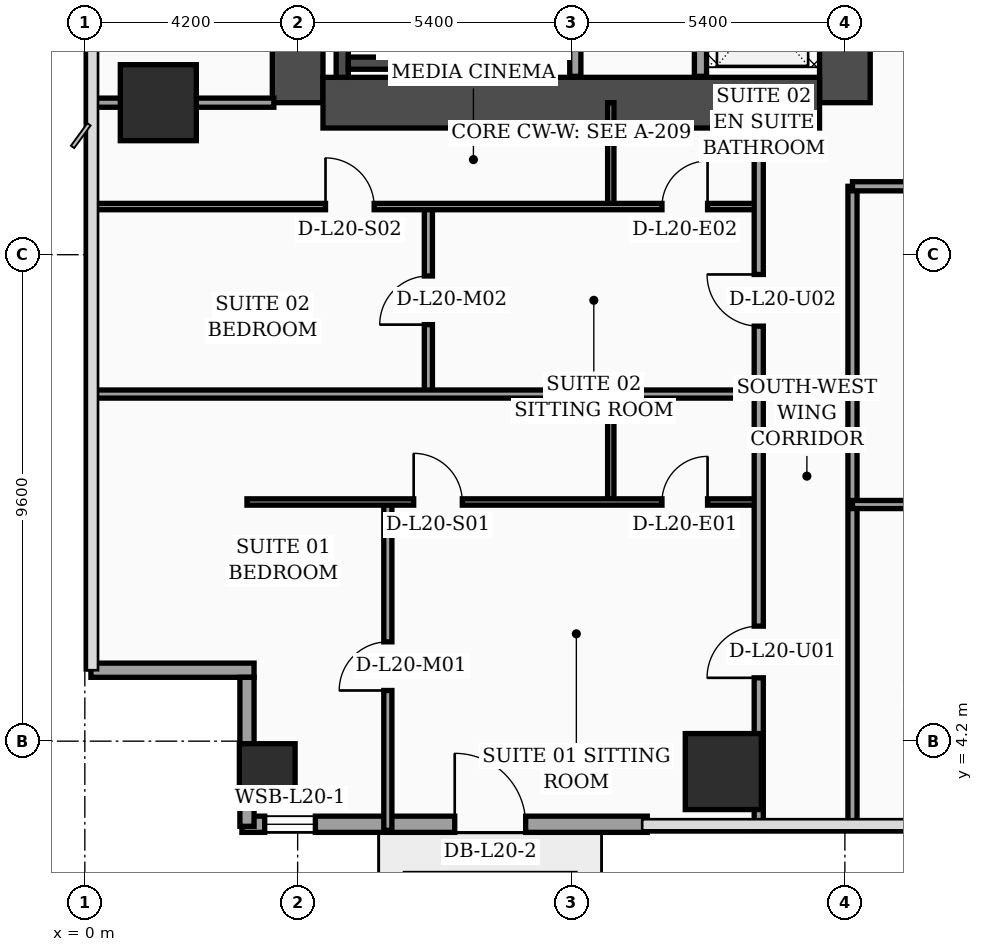
"""IFC4 building model, lengths in metres.
Left out: names, types, materials, properties, quantities, classifications, styles, units other than length and angle.
Written with IfcOpenShell. Run it as: python <this file> out.ifc"""

import sys

from ifc_helpers import new_model, si_unit, direction, frame, frame_2d, origin, origin_2d, place, context, subcontext, project, spatial, rectangle, hollow_rectangle, extrude, element, fill, save


model = new_model("IFC4")
c1 = context("Model", 3, precision=1e-05, world=origin(), true_north=direction((0.0, 1.0)))
c2 = subcontext(c1, "Body", "Model", "MODEL_VIEW")
j1 = project(units=[si_unit("LENGTHUNIT", "METRE"), si_unit("PLANEANGLEUNIT", "RADIAN")], contexts=[c1])
p1 = place(None, origin())
s1 = spatial("IfcSite", under=j1, at=p1, CompositionType="ELEMENT")
p2 = place(p1, origin())
s2 = spatial("IfcBuilding", under=s1, at=p2, CompositionType="ELEMENT")
p3 = place(p2, frame((0.0, 0.0, 85.0)))
s3 = spatial("IfcBuildingStorey", under=s2, at=p3, CompositionType="ELEMENT", Elevation=85.0)
p4 = place(p3, frame((4.2, 16.8, 0.0), z_axis=(0.0, 0.0, 1.0), x_axis=(0.0, 1.0, 0.0)))
e1 = element("IfcWall", 1, at=p4, inside=s3, PredefinedType="SHEAR", context=c2, shape_type="SweptSolid", body=[
    extrude(rectangle(XDim=21.6, YDim=1.0, at=frame_2d((10.8, 0.0))), origin(), (0.0, 0.0, 1.0), 3.56),
])
p5 = place(p3, frame((15.0, 16.8, 0.0), z_axis=(0.0, 0.0, 1.0), x_axis=(0.0, 1.0, 0.0)))
e2 = element("IfcWall", 2, at=p5, inside=s3, PredefinedType="SHEAR", context=c2, shape_type="SweptSolid", body=[
    extrude(rectangle(XDim=21.6, YDim=1.0, at=frame_2d((10.8, 0.0))), origin(), (0.0, 0.0, 1.0), 3.56),
])
p6 = place(p5, frame((8.65, 0.0, 0.0)))
e3 = element("IfcOpeningElement", 3, at=p6, cuts=e2, PredefinedType="OPENING", context=c2, shape_type="SweptSolid", body=[
    extrude(rectangle(XDim=1.1, YDim=2.2, at=frame_2d((0.55, 1.1))), frame((0.0, 0.51, 0.0), z_axis=(0.0, -1.0, 0.0), x_axis=(1.0, 0.0, 0.0)), (0.0, 0.0, 1.0), 1.02),
])
p7 = place(p5, frame((1.25, 0.0, 0.0)))
e4 = element("IfcOpeningElement", 4, at=p7, cuts=e2, PredefinedType="OPENING", context=c2, shape_type="SweptSolid", body=[
    extrude(rectangle(XDim=1.1, YDim=2.2, at=frame_2d((0.55, 1.1))), frame((0.0, 0.51, 0.0), z_axis=(0.0, -1.0, 0.0), x_axis=(1.0, 0.0, 0.0)), (0.0, 0.0, 1.0), 1.02),
])
p8 = place(p5, frame((3.8, 0.0, 0.0)))
e5 = element("IfcOpeningElement", 5, at=p8, cuts=e2, PredefinedType="OPENING", context=c2, shape_type="SweptSolid", body=[
    extrude(rectangle(XDim=1.1, YDim=2.2, at=frame_2d((0.55, 1.1))), frame((0.0, 0.51, 0.0), z_axis=(0.0, -1.0, 0.0), x_axis=(1.0, 0.0, 0.0)), (0.0, 0.0, 1.0), 1.02),
])
p9 = place(p5, frame((6.35, 0.0, 0.0)))
e6 = element("IfcOpeningElement", 6, at=p9, cuts=e2, PredefinedType="OPENING", context=c2, shape_type="SweptSolid", body=[
    extrude(rectangle(XDim=1.1, YDim=2.2, at=frame_2d((0.55, 1.1))), frame((0.0, 0.51, 0.0), z_axis=(0.0, -1.0, 0.0), x_axis=(1.0, 0.0, 0.0)), (0.0, 0.0, 1.0), 1.02),
])
p10 = place(p3, frame((4.7, 16.8, 0.0), z_axis=(0.0, 0.0, 1.0), x_axis=(1.0, 0.0, 0.0)))
e7 = element("IfcWall", 7, at=p10, inside=s3, PredefinedType="SHEAR", context=c2, shape_type="SweptSolid", body=[
    extrude(rectangle(XDim=9.8, YDim=1.0, at=frame_2d((4.9, 0.0))), origin(), (0.0, 0.0, 1.0), 3.56),
])
p11 = place(p3, frame((5.08, 17.3, 0.0), z_axis=(0.0, 0.0, 1.0), x_axis=(0.0, 1.0, 0.0)))
e8 = element("IfcWall", 8, at=p11, inside=s3, PredefinedType="SOLIDWALL", context=c2, shape_type="SweptSolid", body=[
    extrude(rectangle(XDim=9.49, YDim=0.24, at=frame_2d((4.745, 0.0))), origin(), (0.0, 0.0, 1.0), 3.56),
])
p12 = place(p3, frame((8.42, 17.3, 0.0), z_axis=(0.0, 0.0, 1.0), x_axis=(0.0, 1.0, 0.0)))
e9 = element("IfcWall", 9, at=p12, inside=s3, PredefinedType="SOLIDWALL", context=c2, shape_type="SweptSolid", body=[
    extrude(rectangle(XDim=9.49, YDim=0.24, at=frame_2d((4.745, 0.0))), origin(), (0.0, 0.0, 1.0), 3.56),
])
p13 = place(p12, frame((0.35, 0.0, 0.0)))
e10 = element("IfcOpeningElement", 10, at=p13, cuts=e9, PredefinedType="OPENING", context=c2, shape_type="SweptSolid", body=[
    extrude(rectangle(XDim=1.15, YDim=2.2, at=frame_2d((0.575, 1.1))), frame((0.0, 0.13, 0.0), z_axis=(0.0, -1.0, 0.0), x_axis=(1.0, 0.0, 0.0)), (0.0, 0.0, 1.0), 0.26),
])
p14 = place(p3, frame((5.2, 17.58, 0.0), z_axis=(0.0, 0.0, 1.0), x_axis=(1.0, 0.0, 0.0)))
e11 = element("IfcWall", 11, at=p14, inside=s3, PredefinedType="SOLIDWALL", context=c2, shape_type="SweptSolid", body=[
    extrude(rectangle(XDim=3.1, YDim=0.24, at=frame_2d((1.55, 0.0))), origin(), (0.0, 0.0, 1.0), 3.56),
])
p15 = place(p3, frame((3.6, 3.6, 0.0), z_axis=(0.0, 0.0, 1.0), x_axis=(1.0, 0.0, 0.0)))
e12 = element("IfcColumn", 12, at=p15, inside=s3, PredefinedType="COLUMN", context=c2, shape_type="SweptSolid", body=[
    extrude(hollow_rectangle(XDim=1.1, YDim=1.1, WallThickness=0.045, at=origin_2d()), origin(), (0.0, 0.0, 1.0), 3.56),
])
for number, where, z_axis, x_axis in (
    (13, (1.45, 16.8, 0.0), (0.0, 0.0, 1.0), (1.0, 0.0, 0.0)),
    (14, (12.6, 3.6, 0.0), (0.0, 0.0, 1.0), (1.0, 0.0, 0.0)),
):
    element("IfcColumn", number, at=place(p3, frame(where, z_axis=z_axis, x_axis=x_axis)), inside=s3, PredefinedType="COLUMN", context=c2, shape_type="SweptSolid", body=[
        extrude(rectangle(XDim=1.5, YDim=1.5, at=origin_2d()), origin(), (0.0, 0.0, 1.0), 3.56),
    ])
p16 = place(p3, frame((3.1, 2.56, 0.0), z_axis=(0.0, 0.0, 1.0), x_axis=(1.0, 0.0, 0.0)))
e15 = element("IfcWall", 15, at=p16, inside=s3, PredefinedType="SOLIDWALL", context=c2, shape_type="SweptSolid", body=[
    extrude(rectangle(XDim=8.0, YDim=0.32, at=frame_2d((4.0, 0.0))), origin(), (0.0, 0.0, 1.0), 3.56),
])
p17 = place(p16, frame((0.45, 0.0, 0.75)))
e16 = element("IfcOpeningElement", 16, at=p17, cuts=e15, PredefinedType="OPENING", context=c2, shape_type="SweptSolid", body=[
    extrude(rectangle(XDim=1.0, YDim=1.6, at=frame_2d((0.5, 0.8))), frame((0.0, 0.17, 0.0), z_axis=(0.0, -1.0, 0.0), x_axis=(1.0, 0.0, 0.0)), (0.0, 0.0, 1.0), 0.34),
])
p18 = place(p16, frame((4.2, 0.0, 0.0)))
e17 = element("IfcOpeningElement", 17, at=p18, cuts=e15, PredefinedType="OPENING", context=c2, shape_type="SweptSolid", body=[
    extrude(rectangle(XDim=1.4, YDim=2.25, at=frame_2d((0.7, 1.125))), frame((0.0, 0.17, 0.0), z_axis=(0.0, -1.0, 0.0), x_axis=(1.0, 0.0, 0.0)), (0.0, 0.0, 1.0), 0.34),
])
p19 = place(p3, frame((0.12, 5.6, 0.0), z_axis=(0.0, 0.0, 1.0), x_axis=(1.0, 0.0, 0.0)))
e18 = element("IfcWall", 18, at=p19, inside=s3, PredefinedType="SOLIDWALL", context=c2, shape_type="SweptSolid", body=[
    extrude(rectangle(XDim=3.22, YDim=0.28, at=frame_2d((1.61, 0.0))), origin(), (0.0, 0.0, 1.0), 2.84),
])
p20 = place(p3, frame((3.2, 5.46, 0.0), z_axis=(0.0, 0.0, 1.0), x_axis=(0.0, -1.0, 0.0)))
e19 = element("IfcWall", 19, at=p20, inside=s3, PredefinedType="SOLIDWALL", context=c2, shape_type="SweptSolid", body=[
    extrude(rectangle(XDim=2.94, YDim=0.28, at=frame_2d((1.47, 0.0))), origin(), (0.0, 0.0, 1.0), 2.84),
])
p21 = place(p3, frame((9.68, 17.32, 0.0), z_axis=(0.0, 0.0, 1.0), x_axis=(0.0, 1.0, 0.0)))
e20 = element("IfcWall", 20, at=p21, inside=s3, PredefinedType="SOLIDWALL", context=c2, shape_type="SweptSolid", body=[
    extrude(rectangle(XDim=7.68, YDim=0.22, at=frame_2d((3.84, 0.0))), origin(), (0.0, 0.0, 1.0), 3.56),
])
p22 = place(p3, frame((12.15, 17.32, 0.0), z_axis=(0.0, 0.0, 1.0), x_axis=(0.0, 1.0, 0.0)))
e21 = element("IfcWall", 21, at=p22, inside=s3, PredefinedType="SOLIDWALL", context=c2, shape_type="SweptSolid", body=[
    extrude(rectangle(XDim=7.65, YDim=0.24, at=frame_2d((3.825, 0.0))), origin(), (0.0, 0.0, 1.0), 3.56),
])
p23 = place(p3, frame((0.08, 16.8, 0.0), z_axis=(0.0, 0.0, 1.0), x_axis=(1.0, 0.0, 0.0)))
e22 = element("IfcWall", 22, at=p23, inside=s3, PredefinedType="PARTITIONING", context=c2, shape_type="SweptSolid", body=[
    extrude(rectangle(XDim=3.65, YDim=0.18, at=frame_2d((1.825, 0.0))), origin(), (0.0, 0.0, 1.0), 2.84),
])
p24 = place(p3, frame((10.38, 8.92, 0.0), z_axis=(0.0, 0.0, 1.0), x_axis=(0.0, 1.0, 0.0)))
e23 = element("IfcWall", 23, at=p24, inside=s3, PredefinedType="PARTITIONING", context=c2, shape_type="SweptSolid", body=[
    extrude(rectangle(XDim=2.13, YDim=0.125, at=frame_2d((1.065, 0.0))), origin(), (0.0, 0.0, 1.0), 3.14),
])
p25 = place(p3, frame((5.98, 2.44, 0.0), z_axis=(0.0, 0.0, 1.0), x_axis=(0.0, 1.0, 0.0)))
e24 = element("IfcWall", 24, at=p25, inside=s3, PredefinedType="PARTITIONING", context=c2, shape_type="SweptSolid", body=[
    extrude(rectangle(XDim=6.48, YDim=0.16, at=frame_2d((3.24, 0.0))), origin(), (0.0, 0.0, 1.0), 3.04),
])
p26 = place(p25, frame((2.76, 0.0, 0.0)))
e25 = element("IfcOpeningElement", 25, at=p26, cuts=e24, PredefinedType="OPENING", context=c2, shape_type="SweptSolid", body=[
    extrude(rectangle(XDim=0.96, YDim=2.2, at=frame_2d((0.48, 1.1))), frame((0.0, 0.09, 0.0), z_axis=(0.0, -1.0, 0.0), x_axis=(1.0, 0.0, 0.0)), (0.0, 0.0, 1.0), 0.18),
])
p27 = place(p3, frame((3.2, 8.92, 0.0), z_axis=(0.0, 0.0, 1.0), x_axis=(1.0, 0.0, 0.0)))
e26 = element("IfcWall", 26, at=p27, inside=s3, PredefinedType="PARTITIONING", context=c2, shape_type="SweptSolid", body=[
    extrude(rectangle(XDim=10.1, YDim=0.125, at=frame_2d((5.05, 0.0))), origin(), (0.0, 0.0, 1.0), 2.84),
])
p28 = place(p27, frame((3.29, 0.0, 0.0)))
e27 = element("IfcOpeningElement", 27, at=p28, cuts=e26, PredefinedType="OPENING", context=c2, shape_type="SweptSolid", body=[
    extrude(rectangle(XDim=0.96, YDim=2.2, at=frame_2d((0.48, 1.1))), frame((0.0, 0.073, 0.0), z_axis=(0.0, -1.0, 0.0), x_axis=(1.0, 0.0, 0.0)), (0.0, 0.0, 1.0), 0.145),
])
p29 = place(p27, frame((8.19, 0.0, 0.0)))
e28 = element("IfcOpeningElement", 28, at=p29, cuts=e26, PredefinedType="OPENING", context=c2, shape_type="SweptSolid", body=[
    extrude(rectangle(XDim=0.9, YDim=2.15, at=frame_2d((0.45, 1.075))), frame((0.0, 0.073, 0.0), z_axis=(0.0, -1.0, 0.0), x_axis=(1.0, 0.0, 0.0)), (0.0, 0.0, 1.0), 0.145),
])
p30 = place(p3, frame((10.38, 14.75, 0.0), z_axis=(0.0, 0.0, 1.0), x_axis=(0.0, 1.0, 0.0)))
e29 = element("IfcWall", 29, at=p30, inside=s3, PredefinedType="PARTITIONING", context=c2, shape_type="SweptSolid", body=[
    extrude(rectangle(XDim=2.05, YDim=0.125, at=frame_2d((1.025, 0.0))), origin(), (0.0, 0.0, 1.0), 3.56),
])
p31 = place(p3, frame((6.78, 11.05, 0.0), z_axis=(0.0, 0.0, 1.0), x_axis=(0.0, 1.0, 0.0)))
e30 = element("IfcWall", 30, at=p31, inside=s3, PredefinedType="PARTITIONING", context=c2, shape_type="SweptSolid", body=[
    extrude(rectangle(XDim=3.7, YDim=0.16, at=frame_2d((1.85, 0.0))), origin(), (0.0, 0.0, 1.0), 3.56),
])
p32 = place(p31, frame((1.37, 0.0, 0.0)))
e31 = element("IfcOpeningElement", 31, at=p32, cuts=e30, PredefinedType="OPENING", context=c2, shape_type="SweptSolid", body=[
    extrude(rectangle(XDim=0.96, YDim=2.2, at=frame_2d((0.48, 1.1))), frame((0.0, 0.09, 0.0), z_axis=(0.0, -1.0, 0.0), x_axis=(1.0, 0.0, 0.0)), (0.0, 0.0, 1.0), 0.18),
])
p33 = place(p3, frame((0.08, 14.75, 0.0), z_axis=(0.0, 0.0, 1.0), x_axis=(1.0, 0.0, 0.0)))
e32 = element("IfcWall", 32, at=p33, inside=s3, PredefinedType="PARTITIONING", context=c2, shape_type="SweptSolid", body=[
    extrude(rectangle(XDim=13.22, YDim=0.125, at=frame_2d((6.61, 0.0))), origin(), (0.0, 0.0, 1.0), 2.84),
])
p34 = place(p33, frame((4.67, 0.0, 0.0)))
e33 = element("IfcOpeningElement", 33, at=p34, cuts=e32, PredefinedType="OPENING", context=c2, shape_type="SweptSolid", body=[
    extrude(rectangle(XDim=0.96, YDim=2.2, at=frame_2d((0.48, 1.1))), frame((0.0, 0.073, 0.0), z_axis=(0.0, -1.0, 0.0), x_axis=(1.0, 0.0, 0.0)), (0.0, 0.0, 1.0), 0.145),
])
p35 = place(p33, frame((11.31, 0.0, 0.0)))
e34 = element("IfcOpeningElement", 34, at=p35, cuts=e32, PredefinedType="OPENING", context=c2, shape_type="SweptSolid", body=[
    extrude(rectangle(XDim=0.9, YDim=2.15, at=frame_2d((0.45, 1.075))), frame((0.0, 0.073, 0.0), z_axis=(0.0, -1.0, 0.0), x_axis=(1.0, 0.0, 0.0)), (0.0, 0.0, 1.0), 0.145),
])
p36 = place(p3, frame((0.08, 11.05, 0.0), z_axis=(0.0, 0.0, 1.0), x_axis=(1.0, 0.0, 0.0)))
e35 = element("IfcWall", 35, at=p36, inside=s3, PredefinedType="PARTITIONING", context=c2, shape_type="SweptSolid", body=[
    extrude(rectangle(XDim=13.22, YDim=0.16, at=frame_2d((6.61, 0.0))), origin(), (0.0, 0.0, 1.0), 2.84),
])
p37 = place(p3, frame((13.3, 2.44, 0.0), z_axis=(0.0, 0.0, 1.0), x_axis=(0.0, 1.0, 0.0)))
e36 = element("IfcWall", 36, at=p37, inside=s3, PredefinedType="PARTITIONING", context=c2, shape_type="SweptSolid", body=[
    extrude(rectangle(XDim=14.36, YDim=0.18, at=frame_2d((7.18, 0.0))), origin(), (0.0, 0.0, 1.0), 3.04),
])
p38 = place(p37, frame((3.01, 0.0, 0.0)))
e37 = element("IfcOpeningElement", 37, at=p38, cuts=e36, PredefinedType="OPENING", context=c2, shape_type="SweptSolid", body=[
    extrude(rectangle(XDim=1.02, YDim=2.2, at=frame_2d((0.51, 1.1))), frame((0.0, 0.1, 0.0), z_axis=(0.0, -1.0, 0.0), x_axis=(1.0, 0.0, 0.0)), (0.0, 0.0, 1.0), 0.2),
])
p39 = place(p37, frame((9.95, 0.0, 0.0)))
e38 = element("IfcOpeningElement", 38, at=p39, cuts=e36, PredefinedType="OPENING", context=c2, shape_type="SweptSolid", body=[
    extrude(rectangle(XDim=1.02, YDim=2.2, at=frame_2d((0.51, 1.1))), frame((0.0, 0.1, 0.0), z_axis=(0.0, -1.0, 0.0), x_axis=(1.0, 0.0, 0.0)), (0.0, 0.0, 1.0), 0.2),
])
p40 = place(p3, frame((15.15, 2.44, 0.0), z_axis=(0.0, 0.0, 1.0), x_axis=(0.0, 1.0, 0.0)))
e39 = element("IfcWall", 39, at=p40, inside=s3, PredefinedType="PARTITIONING", context=c2, shape_type="SweptSolid", body=[
    extrude(rectangle(XDim=12.71, YDim=0.18, at=frame_2d((6.355, 0.0))), origin(), (0.0, 0.0, 1.0), 3.04),
])
p41 = place(p3, frame((15.15, 8.87, 0.0), z_axis=(0.0, 0.0, 1.0), x_axis=(1.0, 0.0, 0.0)))
e40 = element("IfcWall", 40, at=p41, inside=s3, PredefinedType="PARTITIONING", context=c2, shape_type="SweptSolid", body=[
    extrude(rectangle(XDim=4.45, YDim=0.16, at=frame_2d((2.225, 0.0))), origin(), (0.0, 0.0, 1.0), 3.56),
])
p42 = place(p41, frame((1.75, 0.0, 0.0)))
e41 = element("IfcOpeningElement", 41, at=p42, cuts=e40, PredefinedType="OPENING", context=c2, shape_type="SweptSolid", body=[
    extrude(rectangle(XDim=0.96, YDim=2.2, at=frame_2d((0.48, 1.1))), frame((0.0, 0.09, 0.0), z_axis=(0.0, -1.0, 0.0), x_axis=(1.0, 0.0, 0.0)), (0.0, 0.0, 1.0), 0.18),
])
p43 = place(p3, frame((15.15, 15.15, 0.0), z_axis=(0.0, 0.0, 1.0), x_axis=(1.0, 0.0, 0.0)))
e42 = element("IfcWall", 42, at=p43, inside=s3, PredefinedType="PARTITIONING", context=c2, shape_type="SweptSolid", body=[
    extrude(rectangle(XDim=6.45, YDim=0.18, at=frame_2d((3.225, 0.0))), origin(), (0.0, 0.0, 1.0), 2.34),
])
p44 = place(p43, frame((1.74, 0.0, 0.0)))
e43 = element("IfcOpeningElement", 43, at=p44, cuts=e42, PredefinedType="OPENING", context=c2, shape_type="SweptSolid", body=[
    extrude(rectangle(XDim=1.02, YDim=2.2, at=frame_2d((0.51, 1.1))), frame((0.0, 0.1, 0.0), z_axis=(0.0, -1.0, 0.0), x_axis=(1.0, 0.0, 0.0)), (0.0, 0.0, 1.0), 0.2),
])
p45 = place(p17, origin())
e44 = element("IfcWindow", 44, at=p45, inside=s3, PartitioningType="SINGLE_PANEL", PredefinedType="WINDOW", context=c2, shape_type="SweptSolid", body=[
    extrude(rectangle(XDim=1.0, YDim=1.6, at=frame_2d((0.5, 0.8))), frame((0.0, 0.03, 0.0), z_axis=(0.0, -1.0, 0.0), x_axis=(1.0, 0.0, 0.0)), (0.0, 0.0, 1.0), 0.06),
])
fill(e16, e44)
p46 = place(p18, origin())
e45 = element("IfcDoor", 45, at=p46, inside=s3, OperationType="SINGLE_SWING_LEFT", PredefinedType="DOOR", context=c2, shape_type="SweptSolid", body=[
    extrude(rectangle(XDim=1.4, YDim=2.25, at=frame_2d((0.7, 1.125))), frame((0.0, 0.025, 0.0), z_axis=(0.0, -1.0, 0.0), x_axis=(1.0, 0.0, 0.0)), (0.0, 0.0, 1.0), 0.05),
])
fill(e17, e45)
p47 = place(p26, origin())
e46 = element("IfcDoor", 46, at=p47, inside=s3, OperationType="SINGLE_SWING_LEFT", PredefinedType="DOOR", context=c2, shape_type="SweptSolid", body=[
    extrude(rectangle(XDim=0.96, YDim=2.2, at=frame_2d((0.48, 1.1))), frame((0.0, 0.025, 0.0), z_axis=(0.0, -1.0, 0.0), x_axis=(1.0, 0.0, 0.0)), (0.0, 0.0, 1.0), 0.05),
])
fill(e25, e46)
p48 = place(p28, origin())
e47 = element("IfcDoor", 47, at=p48, inside=s3, OperationType="SINGLE_SWING_LEFT", PredefinedType="DOOR", context=c2, shape_type="SweptSolid", body=[
    extrude(rectangle(XDim=0.96, YDim=2.2, at=frame_2d((0.48, 1.1))), frame((0.0, 0.025, 0.0), z_axis=(0.0, -1.0, 0.0), x_axis=(1.0, 0.0, 0.0)), (0.0, 0.0, 1.0), 0.05),
])
fill(e27, e47)
p49 = place(p29, origin())
e48 = element("IfcDoor", 48, at=p49, inside=s3, OperationType="SINGLE_SWING_RIGHT", PredefinedType="DOOR", context=c2, shape_type="SweptSolid", body=[
    extrude(rectangle(XDim=0.9, YDim=2.15, at=frame_2d((0.45, 1.075))), frame((0.0, 0.025, 0.0), z_axis=(0.0, -1.0, 0.0), x_axis=(1.0, 0.0, 0.0)), (0.0, 0.0, 1.0), 0.05),
])
fill(e28, e48)
p50 = place(p32, origin())
e49 = element("IfcDoor", 49, at=p50, inside=s3, OperationType="SINGLE_SWING_LEFT", PredefinedType="DOOR", context=c2, shape_type="SweptSolid", body=[
    extrude(rectangle(XDim=0.96, YDim=2.2, at=frame_2d((0.48, 1.1))), frame((0.0, 0.025, 0.0), z_axis=(0.0, -1.0, 0.0), x_axis=(1.0, 0.0, 0.0)), (0.0, 0.0, 1.0), 0.05),
])
fill(e31, e49)
p51 = place(p34, origin())
e50 = element("IfcDoor", 50, at=p51, inside=s3, OperationType="SINGLE_SWING_LEFT", PredefinedType="DOOR", context=c2, shape_type="SweptSolid", body=[
    extrude(rectangle(XDim=0.96, YDim=2.2, at=frame_2d((0.48, 1.1))), frame((0.0, 0.025, 0.0), z_axis=(0.0, -1.0, 0.0), x_axis=(1.0, 0.0, 0.0)), (0.0, 0.0, 1.0), 0.05),
])
fill(e33, e50)
p52 = place(p35, origin())
e51 = element("IfcDoor", 51, at=p52, inside=s3, OperationType="SINGLE_SWING_RIGHT", PredefinedType="DOOR", context=c2, shape_type="SweptSolid", body=[
    extrude(rectangle(XDim=0.9, YDim=2.15, at=frame_2d((0.45, 1.075))), frame((0.0, 0.025, 0.0), z_axis=(0.0, -1.0, 0.0), x_axis=(1.0, 0.0, 0.0)), (0.0, 0.0, 1.0), 0.05),
])
fill(e34, e51)
p53 = place(p38, origin())
e52 = element("IfcDoor", 52, at=p53, inside=s3, OperationType="SINGLE_SWING_LEFT", PredefinedType="DOOR", context=c2, shape_type="SweptSolid", body=[
    extrude(rectangle(XDim=1.02, YDim=2.2, at=frame_2d((0.51, 1.1))), frame((0.0, 0.025, 0.0), z_axis=(0.0, -1.0, 0.0), x_axis=(1.0, 0.0, 0.0)), (0.0, 0.0, 1.0), 0.05),
])
fill(e37, e52)
p54 = place(p39, origin())
e53 = element("IfcDoor", 53, at=p54, inside=s3, OperationType="SINGLE_SWING_RIGHT", PredefinedType="DOOR", context=c2, shape_type="SweptSolid", body=[
    extrude(rectangle(XDim=1.02, YDim=2.2, at=frame_2d((0.51, 1.1))), frame((0.0, 0.025, 0.0), z_axis=(0.0, -1.0, 0.0), x_axis=(1.0, 0.0, 0.0)), (0.0, 0.0, 1.0), 0.05),
])
fill(e38, e53)
p55 = place(p13, origin())
e54 = element("IfcDoor", 54, at=p55, inside=s3, OperationType="SINGLE_SWING_LEFT", PredefinedType="DOOR", context=c2, shape_type="SweptSolid", body=[
    extrude(rectangle(XDim=1.15, YDim=2.2, at=frame_2d((0.575, 1.1))), frame((0.0, 0.025, 0.0), z_axis=(0.0, -1.0, 0.0), x_axis=(1.0, 0.0, 0.0)), (0.0, 0.0, 1.0), 0.05),
])
fill(e10, e54)
save(model, sys.argv[1])
